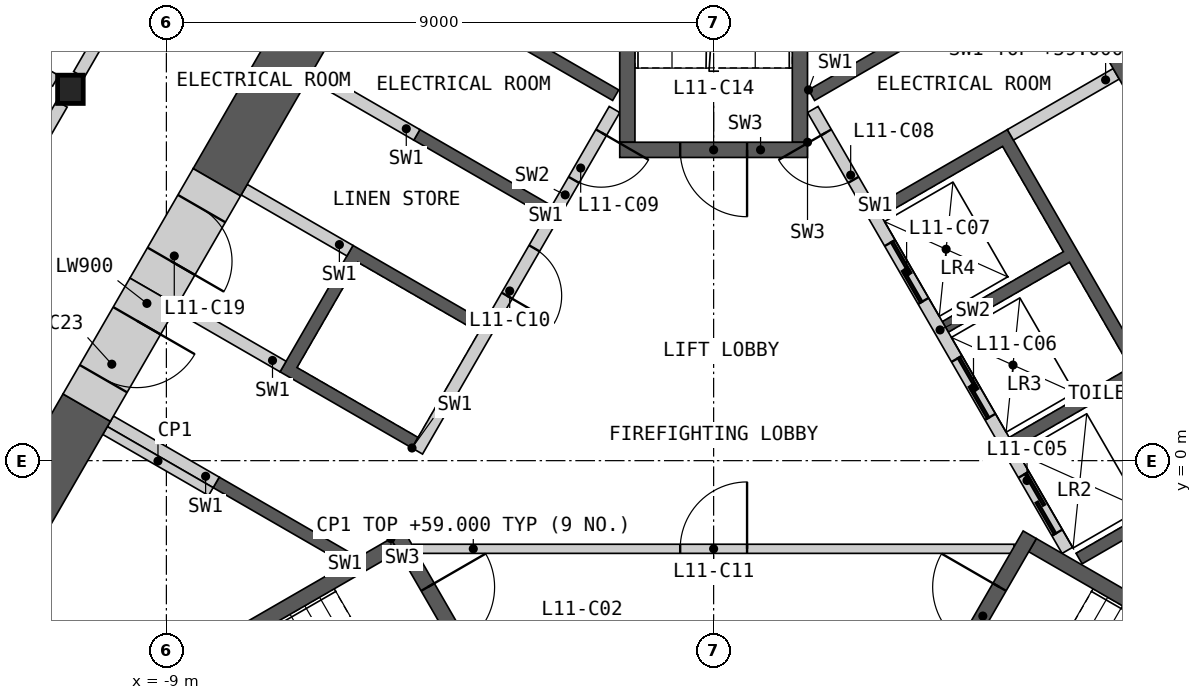
"""IFC4 building model, lengths in metres.
Left out: names, types, materials, properties, quantities, classifications, styles, units other than length and angle.
Written with IfcOpenShell. Run it as: python <this file> out.ifc"""

import sys

from ifc_helpers import new_model, si_unit, direction, frame, frame_2d, origin, origin_2d, place, context, subcontext, project, spatial, polyline, rectangle, i_section, outline, extrude, element, fill, save


model = new_model("IFC4")
c1 = context("Model", 3, precision=1e-05, world=origin(), true_north=direction((0.0, 1.0)))
c2 = subcontext(c1, "Body", "Model", "MODEL_VIEW")
j1 = project(units=[si_unit("LENGTHUNIT", "METRE"), si_unit("PLANEANGLEUNIT", "RADIAN")], contexts=[c1])
p1 = place(None, origin())
s1 = spatial("IfcSite", under=j1, at=p1, CompositionType="ELEMENT")
p2 = place(p1, origin())
s2 = spatial("IfcBuilding", under=s1, at=p2, CompositionType="ELEMENT")
p3 = place(p2, frame((0.0, 0.0, 55.2)))
s3 = spatial("IfcBuildingStorey", under=s2, at=p3, CompositionType="ELEMENT", Elevation=55.2)
p4 = place(p3, frame((-10.578, 6.107, 0.0), z_axis=(0.0, 0.0, 1.0), x_axis=(1.0, 0.0, 0.0)))
e1 = element("IfcColumn", 1, at=p4, inside=s3, PredefinedType="COLUMN", context=c2, shape_type="SweptSolid", body=[
    extrude(i_section(OverallWidth=0.421, OverallDepth=0.465, WebThickness=0.045, FlangeThickness=0.072, at=origin_2d()), origin(), (0.0, 0.0, 1.0), 4.2),
])
p5 = place(p3, origin())
e2 = element("IfcWall", 2, at=p5, inside=s3, PredefinedType="SHEAR", context=c2, shape_type="SweptSolid", body=[
    extrude(outline(polyline([(1.561, 6.097), (3.731, 7.35), (3.831, 7.177), (1.66, 5.924), (1.561, 6.097)])), origin(), (0.0, 0.0, 1.0), 3.8),
])
p6 = place(p3, origin())
e3 = element("IfcWall", 3, at=p6, inside=s3, PredefinedType="SHEAR", context=c2, shape_type="SweptSolid", body=[
    extrude(outline(polyline([(2.66, 4.192), (4.831, 5.445), (8.231, -0.444), (6.061, -1.697), (5.96, -1.524), (7.952, -0.374), (6.952, 1.358), (4.96, 0.208), (4.861, 0.381), (6.852, 1.531), (5.852, 3.263), (3.861, 2.113), (3.76, 2.287), (5.752, 3.437), (4.752, 5.169), (2.76, 4.019), (2.66, 4.192)])), origin(), (0.0, 0.0, 1.0), 3.8),
])
p7 = place(p3, frame((5.817, -1.476, 0.0), z_axis=(0.0, 0.0, 1.0), x_axis=(-0.500002616675, 0.866023893041, 0.0)))
e4 = element("IfcWall", 4, at=p7, inside=s3, PredefinedType="SOLIDWALL", context=c2, shape_type="SweptSolid", body=[
    extrude(rectangle(XDim=8.373, YDim=0.2, at=frame_2d((4.187, 0.0))), origin(), (0.0, 0.0, 1.0), 3.8),
])
p8 = place(p7, frame((0.337, 0.0, 0.0)))
e5 = element("IfcOpeningElement", 5, at=p8, cuts=e4, PredefinedType="OPENING", context=c2, shape_type="SweptSolid", body=[
    extrude(rectangle(XDim=1.1, YDim=2.1, at=frame_2d((0.55, 1.05))), frame((0.0, 0.11, 0.0), z_axis=(0.0, -1.0, 0.0), x_axis=(1.0, 0.0, 0.0)), (0.0, 0.0, 1.0), 0.22),
])
p9 = place(p7, frame((2.537, 0.0, 0.0)))
e6 = element("IfcOpeningElement", 6, at=p9, cuts=e4, PredefinedType="OPENING", context=c2, shape_type="SweptSolid", body=[
    extrude(rectangle(XDim=1.1, YDim=2.1, at=frame_2d((0.55, 1.05))), frame((0.0, 0.11, 0.0), z_axis=(0.0, -1.0, 0.0), x_axis=(1.0, 0.0, 0.0)), (0.0, 0.0, 1.0), 0.22),
])
p10 = place(p7, frame((4.737, 0.0, 0.0)))
e7 = element("IfcOpeningElement", 7, at=p10, cuts=e4, PredefinedType="OPENING", context=c2, shape_type="SweptSolid", body=[
    extrude(rectangle(XDim=1.1, YDim=2.1, at=frame_2d((0.55, 1.05))), frame((0.0, 0.11, 0.0), z_axis=(0.0, -1.0, 0.0), x_axis=(1.0, 0.0, 0.0)), (0.0, 0.0, 1.0), 0.22),
])
p11 = place(p7, frame((7.037, 0.0, 0.0)))
e8 = element("IfcOpeningElement", 8, at=p11, cuts=e4, PredefinedType="OPENING", context=c2, shape_type="SweptSolid", body=[
    extrude(rectangle(XDim=0.9, YDim=2.1, at=frame_2d((0.45, 1.05))), frame((0.0, 0.11, 0.0), z_axis=(0.0, -1.0, 0.0), x_axis=(1.0, 0.0, 0.0)), (0.0, 0.0, 1.0), 0.22),
])
p12 = place(p3, frame((4.881, 5.358, 0.0), z_axis=(0.0, 0.0, 1.0), x_axis=(0.866035824272, 0.499981950752, 0.0)))
e9 = element("IfcWall", 9, at=p12, inside=s3, PredefinedType="SHEAR", context=c2, shape_type="SweptSolid", body=[
    extrude(rectangle(XDim=2.009, YDim=0.2, at=frame_2d((1.004, 0.0))), origin(), (0.0, 0.0, 1.0), 3.8),
])
p13 = place(p3, origin())
e10 = element("IfcWall", 10, at=p13, inside=s3, PredefinedType="SHEAR", context=c2, shape_type="SweptSolid", body=[
    extrude(outline(polyline([(-6.061, -1.697), (-8.231, -0.444), (-8.131, -0.271), (-5.96, -1.524), (-6.061, -1.697)])), origin(), (0.0, 0.0, 1.0), 3.8),
])
p14 = place(p3, origin())
e11 = element("IfcWall", 11, at=p14, inside=s3, PredefinedType="SHEAR", context=c2, shape_type="SweptSolid", body=[
    extrude(outline(polyline([(-4.96, 0.208), (-7.131, 1.461), (-5.931, 3.54), (-3.76, 2.287), (-3.861, 2.113), (-5.852, 3.263), (-6.852, 1.531), (-4.861, 0.381), (-4.96, 0.208)])), origin(), (0.0, 0.0, 1.0), 3.8),
])
p15 = place(p3, origin())
e12 = element("IfcWall", 12, at=p15, inside=s3, PredefinedType="SHEAR", context=c2, shape_type="SweptSolid", body=[
    extrude(outline(polyline([(-2.76, 4.019), (-4.931, 5.272), (-4.831, 5.445), (-2.66, 4.192), (-2.76, 4.019)])), origin(), (0.0, 0.0, 1.0), 3.8),
])
p16 = place(p3, origin())
e13 = element("IfcWall", 13, at=p16, inside=s3, PredefinedType="SHEAR", context=c2, shape_type="SweptSolid", body=[
    extrude(outline(polyline([(-3.731, 7.35), (-1.561, 6.097), (-1.66, 5.924), (-3.831, 7.177), (-3.731, 7.35)])), origin(), (0.0, 0.0, 1.0), 3.8),
])
p17 = place(p3, frame((-1.631, 5.776, 0.0), z_axis=(0.0, 0.0, 1.0), x_axis=(-0.499992876559, -0.866029516466, 0.0)))
e14 = element("IfcWall", 14, at=p17, inside=s3, PredefinedType="SOLIDWALL", context=c2, shape_type="SweptSolid", body=[
    extrude(rectangle(XDim=6.486, YDim=0.2, at=frame_2d((3.243, 0.0))), origin(), (0.0, 0.0, 1.0), 3.8),
])
p18 = place(p17, frame((0.437, 0.0, 0.0)))
e15 = element("IfcOpeningElement", 15, at=p18, cuts=e14, PredefinedType="OPENING", context=c2, shape_type="SweptSolid", body=[
    extrude(rectangle(XDim=0.9, YDim=2.1, at=frame_2d((0.45, 1.05))), frame((0.0, 0.11, 0.0), z_axis=(0.0, -1.0, 0.0), x_axis=(1.0, 0.0, 0.0)), (0.0, 0.0, 1.0), 0.22),
])
p19 = place(p17, frame((2.637, 0.0, 0.0)))
e16 = element("IfcOpeningElement", 16, at=p19, cuts=e14, PredefinedType="OPENING", context=c2, shape_type="SweptSolid", body=[
    extrude(rectangle(XDim=0.9, YDim=2.1, at=frame_2d((0.45, 1.05))), frame((0.0, 0.11, 0.0), z_axis=(0.0, -1.0, 0.0), x_axis=(1.0, 0.0, 0.0)), (0.0, 0.0, 1.0), 0.22),
])
p20 = place(p3, frame((-4.881, 5.358, 0.0), z_axis=(0.0, 0.0, 1.0), x_axis=(-0.866035824272, 0.499981950752, 0.0)))
e17 = element("IfcWall", 17, at=p20, inside=s3, PredefinedType="SHEAR", context=c2, shape_type="SweptSolid", body=[
    extrude(rectangle(XDim=2.009, YDim=0.2, at=frame_2d((1.004, 0.0))), origin(), (0.0, 0.0, 1.0), 3.8),
])
p21 = place(p3, frame((-5.981, 3.453, 0.0), z_axis=(0.0, 0.0, 1.0), x_axis=(-0.866013584312, 0.500020471368, 0.0)))
e18 = element("IfcWall", 18, at=p21, inside=s3, PredefinedType="SHEAR", context=c2, shape_type="SweptSolid", body=[
    extrude(rectangle(XDim=2.009, YDim=0.2, at=frame_2d((1.005, 0.0))), origin(), (0.0, 0.0, 1.0), 3.8),
])
p22 = place(p3, frame((-7.081, 1.548, 0.0), z_axis=(0.0, 0.0, 1.0), x_axis=(-0.865983199114, 0.50007309351, 0.0)))
e19 = element("IfcWall", 19, at=p22, inside=s3, PredefinedType="SHEAR", context=c2, shape_type="SweptSolid", body=[
    extrude(rectangle(XDim=2.009, YDim=0.2, at=frame_2d((1.004, 0.0))), origin(), (0.0, 0.0, 1.0), 3.8),
])
p23 = place(p3, frame((-8.181, -0.357, 0.0), z_axis=(0.0, 0.0, 1.0), x_axis=(-0.866035824272, 0.499981950752, 0.0)))
e20 = element("IfcWall", 20, at=p23, inside=s3, PredefinedType="SHEAR", context=c2, shape_type="SweptSolid", body=[
    extrude(rectangle(XDim=2.009, YDim=0.2, at=frame_2d((1.004, 0.0))), origin(), (0.0, 0.0, 1.0), 3.8),
])
p24 = place(p3, frame((-4.941, -1.45, 0.0), z_axis=(0.0, 0.0, 1.0), x_axis=(1.0, 0.0, 0.0)))
e21 = element("IfcWall", 21, at=p24, inside=s3, PredefinedType="PARTITIONING", context=c2, shape_type="SweptSolid", body=[
    extrude(rectangle(XDim=9.882, YDim=0.15, at=frame_2d((4.941, 0.0))), origin(), (0.0, 0.0, 1.0), 3.8),
])
p25 = place(p24, frame((4.391, 0.0, 0.0)))
e22 = element("IfcOpeningElement", 22, at=p25, cuts=e21, PredefinedType="OPENING", context=c2, shape_type="SweptSolid", body=[
    extrude(rectangle(XDim=1.1, YDim=2.1, at=frame_2d((0.55, 1.05))), frame((0.0, 0.085, 0.0), z_axis=(0.0, -1.0, 0.0), x_axis=(1.0, 0.0, 0.0)), (0.0, 0.0, 1.0), 0.17),
])
p26 = place(p3, origin())
e23 = element("IfcWall", 23, at=p26, inside=s3, PredefinedType="SHEAR", context=c2, shape_type="SweptSolid", body=[
    extrude(outline(polyline([(-5.307, -1.281), (-10.374, -4.206), (-10.032, -4.298), (-5.182, -1.498), (-5.307, -1.281)])), origin(), (0.0, 0.0, 1.0), 3.8),
])
p27 = place(p3, frame((-5.199, -1.219, 0.0), z_axis=(0.0, 0.0, 1.0), x_axis=(0.499982516597, -0.866035497597, 0.0)))
e24 = element("IfcWall", 24, at=p27, inside=s3, PredefinedType="SHEAR", context=c2, shape_type="SweptSolid", body=[
    extrude(rectangle(XDim=3.088, YDim=0.25, at=frame_2d((1.544, 0.0))), origin(), (0.0, 0.0, 1.0), 3.8),
])
p28 = place(p27, frame((0.994, 0.0, 0.0)))
e25 = element("IfcOpeningElement", 25, at=p28, cuts=e24, PredefinedType="OPENING", context=c2, shape_type="SweptSolid", body=[
    extrude(rectangle(XDim=1.1, YDim=2.1, at=frame_2d((0.55, 1.05))), frame((0.0, 0.135, 0.0), z_axis=(0.0, -1.0, 0.0), x_axis=(1.0, 0.0, 0.0)), (0.0, 0.0, 1.0), 0.27),
])
p29 = place(p3, origin())
e26 = element("IfcWall", 26, at=p29, inside=s3, PredefinedType="SHEAR", context=c2, shape_type="SweptSolid", body=[
    extrude(outline(polyline([(10.032, -4.298), (10.374, -4.206), (5.307, -1.281), (5.182, -1.498), (10.032, -4.298)])), origin(), (0.0, 0.0, 1.0), 3.8),
])
p30 = place(p3, frame((3.655, -3.893, 0.0), z_axis=(0.0, 0.0, 1.0), x_axis=(0.499982516597, 0.866035497597, 0.0)))
e27 = element("IfcWall", 27, at=p30, inside=s3, PredefinedType="SHEAR", context=c2, shape_type="SweptSolid", body=[
    extrude(rectangle(XDim=3.088, YDim=0.25, at=frame_2d((1.544, 0.0))), origin(), (0.0, 0.0, 1.0), 3.8),
])
p31 = place(p30, frame((0.994, 0.0, 0.0)))
e28 = element("IfcOpeningElement", 28, at=p31, cuts=e27, PredefinedType="OPENING", context=c2, shape_type="SweptSolid", body=[
    extrude(rectangle(XDim=1.1, YDim=2.1, at=frame_2d((0.55, 1.05))), frame((0.0, 0.135, 0.0), z_axis=(0.0, -1.0, 0.0), x_axis=(1.0, 0.0, 0.0)), (0.0, 0.0, 1.0), 0.27),
])
p32 = place(p3, origin())
e29 = element("IfcWall", 29, at=p32, inside=s3, PredefinedType="SHEAR", context=c2, shape_type="SweptSolid", body=[
    extrude(outline(polyline([(1.544, 5.237), (1.544, 11.087), (1.294, 10.837), (1.294, 5.237), (1.544, 5.237)])), origin(), (0.0, 0.0, 1.0), 3.8),
])
p33 = place(p3, origin())
e30 = element("IfcWall", 30, at=p33, inside=s3, PredefinedType="SHEAR", context=c2, shape_type="SweptSolid", body=[
    extrude(outline(polyline([(-1.294, 10.837), (-1.544, 11.087), (-1.544, 5.237), (-1.294, 5.237), (-1.294, 10.837)])), origin(), (0.0, 0.0, 1.0), 3.8),
])
p34 = place(p3, frame((1.544, 5.112, 0.0), z_axis=(0.0, 0.0, 1.0), x_axis=(-1.0, 0.0, 0.0)))
e31 = element("IfcWall", 31, at=p34, inside=s3, PredefinedType="SHEAR", context=c2, shape_type="SweptSolid", body=[
    extrude(rectangle(XDim=3.088, YDim=0.25, at=frame_2d((1.544, 0.0))), origin(), (0.0, 0.0, 1.0), 3.8),
])
p35 = place(p34, frame((0.994, 0.0, 0.0)))
e32 = element("IfcOpeningElement", 32, at=p35, cuts=e31, PredefinedType="OPENING", context=c2, shape_type="SweptSolid", body=[
    extrude(rectangle(XDim=1.1, YDim=2.1, at=frame_2d((0.55, 1.05))), frame((0.0, 0.135, 0.0), z_axis=(0.0, -1.0, 0.0), x_axis=(1.0, 0.0, 0.0)), (0.0, 0.0, 1.0), 0.27),
])
p36 = place(p3, frame((-8.268, -0.509, 0.0), z_axis=(0.0, 0.0, 1.0), x_axis=(-0.866035824272, 0.499981950752, 0.0)))
e33 = element("IfcWall", 33, at=p36, inside=s3, PredefinedType="PARTITIONING", context=c2, shape_type="SweptSolid", body=[
    extrude(rectangle(XDim=2.009, YDim=0.15, at=frame_2d((1.004, 0.0))), origin(), (0.0, 0.0, 1.0), 3.8),
])
p37 = place(p3, frame((8.16, 4.596, 0.0), z_axis=(0.0, 0.0, 1.0), x_axis=(-0.500009830349, 0.866019728156, 0.0)))
e34 = element("IfcWall", 34, at=p37, inside=s3, PredefinedType="SHEAR", context=c2, shape_type="SweptSolid", body=[
    extrude(rectangle(XDim=15.541, YDim=0.9, at=frame_2d((7.771, 0.0))), origin(), (0.0, 0.0, 1.0), 3.8),
])
p38 = place(p3, frame((-3.637, 12.43, 0.0), z_axis=(0.0, 0.0, 1.0), x_axis=(-0.500011513458, -0.866018756384, 0.0)))
e35 = element("IfcWall", 35, at=p38, inside=s3, PredefinedType="SHEAR", context=c2, shape_type="SweptSolid", body=[
    extrude(rectangle(XDim=9.066, YDim=0.9, at=frame_2d((4.533, 0.0))), origin(), (0.0, 0.0, 1.0), 3.8),
])
p39 = place(p3, frame((-10.31, 0.872, 0.0), z_axis=(0.0, 0.0, 1.0), x_axis=(-0.499968858743, -0.866043382451, 0.0)))
e36 = element("IfcWall", 36, at=p39, inside=s3, PredefinedType="SHEAR", context=c2, shape_type="SweptSolid", body=[
    extrude(rectangle(XDim=4.546, YDim=0.9, at=frame_2d((2.273, 0.0))), origin(), (0.0, 0.0, 1.0), 3.8),
])
p40 = place(p3, frame((-8.17, 4.579, 0.0), z_axis=(0.0, 0.0, 1.0), x_axis=(-0.499888406853, -0.866089822532, 0.0)))
e37 = element("IfcWall", 37, at=p40, inside=s3, PredefinedType="SHEAR", context=c2, shape_type="SweptSolid", body=[
    extrude(rectangle(XDim=2.08, YDim=0.9, at=frame_2d((1.04, 0.0))), origin(), (0.0, 0.0, 1.0), 3.8),
])
p41 = place(p40, frame((0.5, 0.0, 0.0)))
e38 = element("IfcOpeningElement", 38, at=p41, cuts=e37, PredefinedType="OPENING", context=c2, shape_type="SweptSolid", body=[
    extrude(rectangle(XDim=1.0, YDim=2.1, at=frame_2d((0.5, 1.05))), frame((0.0, 0.46, 0.0), z_axis=(0.0, -1.0, 0.0), x_axis=(1.0, 0.0, 0.0)), (0.0, 0.0, 1.0), 0.92),
])
p42 = place(p3, frame((-9.21, 2.777, 0.0), z_axis=(0.0, 0.0, 1.0), x_axis=(-0.500077893725, -0.86598042715, 0.0)))
e39 = element("IfcWall", 39, at=p42, inside=s3, PredefinedType="SHEAR", context=c2, shape_type="SweptSolid", body=[
    extrude(rectangle(XDim=2.2, YDim=0.9, at=frame_2d((1.1, 0.0))), origin(), (0.0, 0.0, 1.0), 3.8),
])
p43 = place(p42, frame((0.55, 0.0, 0.0)))
e40 = element("IfcOpeningElement", 40, at=p43, cuts=e39, PredefinedType="OPENING", context=c2, shape_type="SweptSolid", body=[
    extrude(rectangle(XDim=1.1, YDim=2.1, at=frame_2d((0.55, 1.05))), frame((0.0, 0.46, 0.0), z_axis=(0.0, -1.0, 0.0), x_axis=(1.0, 0.0, 0.0)), (0.0, 0.0, 1.0), 0.92),
])
p44 = place(p3, frame((5.429, 15.026, 0.0), z_axis=(0.0, 0.0, 1.0), x_axis=(0.50001002959, -0.86601961312, 0.0)))
e41 = element("IfcWall", 41, at=p44, inside=s3, PredefinedType="PARTITIONING", context=c2, shape_type="SweptSolid", body=[
    extrude(rectangle(XDim=10.019, YDim=0.2, at=frame_2d((5.009, 0.0))), origin(), (0.0, 0.0, 1.0), 3.8),
])
p45 = place(p44, frame((4.059, 0.0, 0.0)))
e42 = element("IfcOpeningElement", 42, at=p45, cuts=e41, PredefinedType="OPENING", context=c2, shape_type="SweptSolid", body=[
    extrude(rectangle(XDim=1.8, YDim=2.1, at=frame_2d((0.9, 1.05))), frame((0.0, 0.11, 0.0), z_axis=(0.0, -1.0, 0.0), x_axis=(1.0, 0.0, 0.0)), (0.0, 0.0, 1.0), 0.22),
])
p46 = place(p3, frame((-10.439, 6.35, 0.0), z_axis=(0.0, 0.0, 1.0), x_axis=(0.50001002959, 0.86601961312, 0.0)))
e43 = element("IfcWall", 43, at=p46, inside=s3, PredefinedType="PARTITIONING", context=c2, shape_type="SweptSolid", body=[
    extrude(rectangle(XDim=10.019, YDim=0.2, at=frame_2d((5.009, 0.0))), origin(), (0.0, 0.0, 1.0), 3.8),
])
p47 = place(p46, frame((4.259, 0.0, 0.0)))
e44 = element("IfcOpeningElement", 44, at=p47, cuts=e43, PredefinedType="OPENING", context=c2, shape_type="SweptSolid", body=[
    extrude(rectangle(XDim=1.0, YDim=2.1, at=frame_2d((0.5, 1.05))), frame((0.0, 0.11, 0.0), z_axis=(0.0, -1.0, 0.0), x_axis=(1.0, 0.0, 0.0)), (0.0, 0.0, 1.0), 0.22),
])
p48 = place(p3, frame((-15.728, -2.811, 0.0), z_axis=(0.0, 0.0, 1.0), x_axis=(0.49999175339, 0.866030164915, 0.0)))
e45 = element("IfcWall", 45, at=p48, inside=s3, PredefinedType="PARTITIONING", context=c2, shape_type="SweptSolid", body=[
    extrude(rectangle(XDim=10.019, YDim=0.2, at=frame_2d((5.009, 0.0))), origin(), (0.0, 0.0, 1.0), 3.8),
])
p49 = place(p48, frame((7.266, 0.0, 0.0)))
e46 = element("IfcOpeningElement", 46, at=p49, cuts=e45, PredefinedType="OPENING", context=c2, shape_type="SweptSolid", body=[
    extrude(rectangle(XDim=1.0, YDim=2.1, at=frame_2d((0.5, 1.05))), frame((0.0, 0.11, 0.0), z_axis=(0.0, -1.0, 0.0), x_axis=(1.0, 0.0, 0.0)), (0.0, 0.0, 1.0), 0.22),
])
p50 = place(p3, frame((-21.947, 12.671, 0.0), z_axis=(0.0, 0.0, 1.0), x_axis=(0.866026729935, -0.499997703033, 0.0)))
e47 = element("IfcWall", 47, at=p50, inside=s3, PredefinedType="PARTITIONING", context=c2, shape_type="SweptSolid", body=[
    extrude(rectangle(XDim=12.848, YDim=0.2, at=frame_2d((6.424, 0.0))), origin(), (0.0, 0.0, 1.0), 2.885),
])
p51 = place(p8, origin())
e48 = element("IfcDoor", 48, at=p51, inside=s3, OperationType="SLIDING_TO_LEFT", PredefinedType="DOOR", context=c2, shape_type="SweptSolid", body=[
    extrude(rectangle(XDim=1.1, YDim=2.1, at=frame_2d((0.55, 1.05))), frame((0.0, 0.025, 0.0), z_axis=(0.0, -1.0, 0.0), x_axis=(1.0, 0.0, 0.0)), (0.0, 0.0, 1.0), 0.05),
])
fill(e5, e48)
p52 = place(p9, origin())
e49 = element("IfcDoor", 49, at=p52, inside=s3, OperationType="SLIDING_TO_LEFT", PredefinedType="DOOR", context=c2, shape_type="SweptSolid", body=[
    extrude(rectangle(XDim=1.1, YDim=2.1, at=frame_2d((0.55, 1.05))), frame((0.0, 0.025, 0.0), z_axis=(0.0, -1.0, 0.0), x_axis=(1.0, 0.0, 0.0)), (0.0, 0.0, 1.0), 0.05),
])
fill(e6, e49)
p53 = place(p10, origin())
e50 = element("IfcDoor", 50, at=p53, inside=s3, OperationType="SLIDING_TO_LEFT", PredefinedType="DOOR", context=c2, shape_type="SweptSolid", body=[
    extrude(rectangle(XDim=1.1, YDim=2.1, at=frame_2d((0.55, 1.05))), frame((0.0, 0.025, 0.0), z_axis=(0.0, -1.0, 0.0), x_axis=(1.0, 0.0, 0.0)), (0.0, 0.0, 1.0), 0.05),
])
fill(e7, e50)
p54 = place(p11, origin())
e51 = element("IfcDoor", 51, at=p54, inside=s3, OperationType="SINGLE_SWING_RIGHT", PredefinedType="DOOR", context=c2, shape_type="SweptSolid", body=[
    extrude(rectangle(XDim=0.9, YDim=2.1, at=frame_2d((0.45, 1.05))), frame((0.0, 0.025, 0.0), z_axis=(0.0, -1.0, 0.0), x_axis=(1.0, 0.0, 0.0)), (0.0, 0.0, 1.0), 0.05),
])
fill(e8, e51)
p55 = place(p18, origin())
e52 = element("IfcDoor", 52, at=p55, inside=s3, OperationType="SINGLE_SWING_LEFT", PredefinedType="DOOR", context=c2, shape_type="SweptSolid", body=[
    extrude(rectangle(XDim=0.9, YDim=2.1, at=frame_2d((0.45, 1.05))), frame((0.0, 0.025, 0.0), z_axis=(0.0, -1.0, 0.0), x_axis=(1.0, 0.0, 0.0)), (0.0, 0.0, 1.0), 0.05),
])
fill(e15, e52)
p56 = place(p19, origin())
e53 = element("IfcDoor", 53, at=p56, inside=s3, OperationType="SINGLE_SWING_RIGHT", PredefinedType="DOOR", context=c2, shape_type="SweptSolid", body=[
    extrude(rectangle(XDim=0.9, YDim=2.1, at=frame_2d((0.45, 1.05))), frame((0.0, 0.025, 0.0), z_axis=(0.0, -1.0, 0.0), x_axis=(1.0, 0.0, 0.0)), (0.0, 0.0, 1.0), 0.05),
])
fill(e16, e53)
p57 = place(p25, origin())
e54 = element("IfcDoor", 54, at=p57, inside=s3, OperationType="SINGLE_SWING_RIGHT", PredefinedType="DOOR", context=c2, shape_type="SweptSolid", body=[
    extrude(rectangle(XDim=1.1, YDim=2.1, at=frame_2d((0.55, 1.05))), frame((0.0, 0.025, 0.0), z_axis=(0.0, -1.0, 0.0), x_axis=(1.0, 0.0, 0.0)), (0.0, 0.0, 1.0), 0.05),
])
fill(e22, e54)
p58 = place(p28, origin())
e55 = element("IfcDoor", 55, at=p58, inside=s3, OperationType="SINGLE_SWING_LEFT", PredefinedType="DOOR", context=c2, shape_type="SweptSolid", body=[
    extrude(rectangle(XDim=1.1, YDim=2.1, at=frame_2d((0.55, 1.05))), frame((0.0, 0.025, 0.0), z_axis=(0.0, -1.0, 0.0), x_axis=(1.0, 0.0, 0.0)), (0.0, 0.0, 1.0), 0.05),
])
fill(e25, e55)
p59 = place(p31, origin())
e56 = element("IfcDoor", 56, at=p59, inside=s3, OperationType="SINGLE_SWING_RIGHT", PredefinedType="DOOR", context=c2, shape_type="SweptSolid", body=[
    extrude(rectangle(XDim=1.1, YDim=2.1, at=frame_2d((0.55, 1.05))), frame((0.0, 0.025, 0.0), z_axis=(0.0, -1.0, 0.0), x_axis=(1.0, 0.0, 0.0)), (0.0, 0.0, 1.0), 0.05),
])
fill(e28, e56)
p60 = place(p35, origin())
e57 = element("IfcDoor", 57, at=p60, inside=s3, OperationType="SINGLE_SWING_LEFT", PredefinedType="DOOR", context=c2, shape_type="SweptSolid", body=[
    extrude(rectangle(XDim=1.1, YDim=2.1, at=frame_2d((0.55, 1.05))), frame((0.0, 0.025, 0.0), z_axis=(0.0, -1.0, 0.0), x_axis=(1.0, 0.0, 0.0)), (0.0, 0.0, 1.0), 0.05),
])
fill(e32, e57)
p61 = place(p41, origin())
e58 = element("IfcDoor", 58, at=p61, inside=s3, OperationType="SINGLE_SWING_RIGHT", PredefinedType="DOOR", context=c2, shape_type="SweptSolid", body=[
    extrude(rectangle(XDim=1.0, YDim=2.1, at=frame_2d((0.5, 1.05))), frame((0.0, 0.205, 0.0), z_axis=(0.0, -1.0, 0.0), x_axis=(1.0, 0.0, 0.0)), (0.0, 0.0, 1.0), 0.05),
])
fill(e38, e58)
p62 = place(p43, origin())
e59 = element("IfcDoor", 59, at=p62, inside=s3, OperationType="SINGLE_SWING_LEFT", PredefinedType="DOOR", context=c2, shape_type="SweptSolid", body=[
    extrude(rectangle(XDim=1.1, YDim=2.1, at=frame_2d((0.55, 1.05))), frame((0.0, 0.205, 0.0), z_axis=(0.0, -1.0, 0.0), x_axis=(1.0, 0.0, 0.0)), (0.0, 0.0, 1.0), 0.05),
])
fill(e40, e59)
save(model, sys.argv[1])
